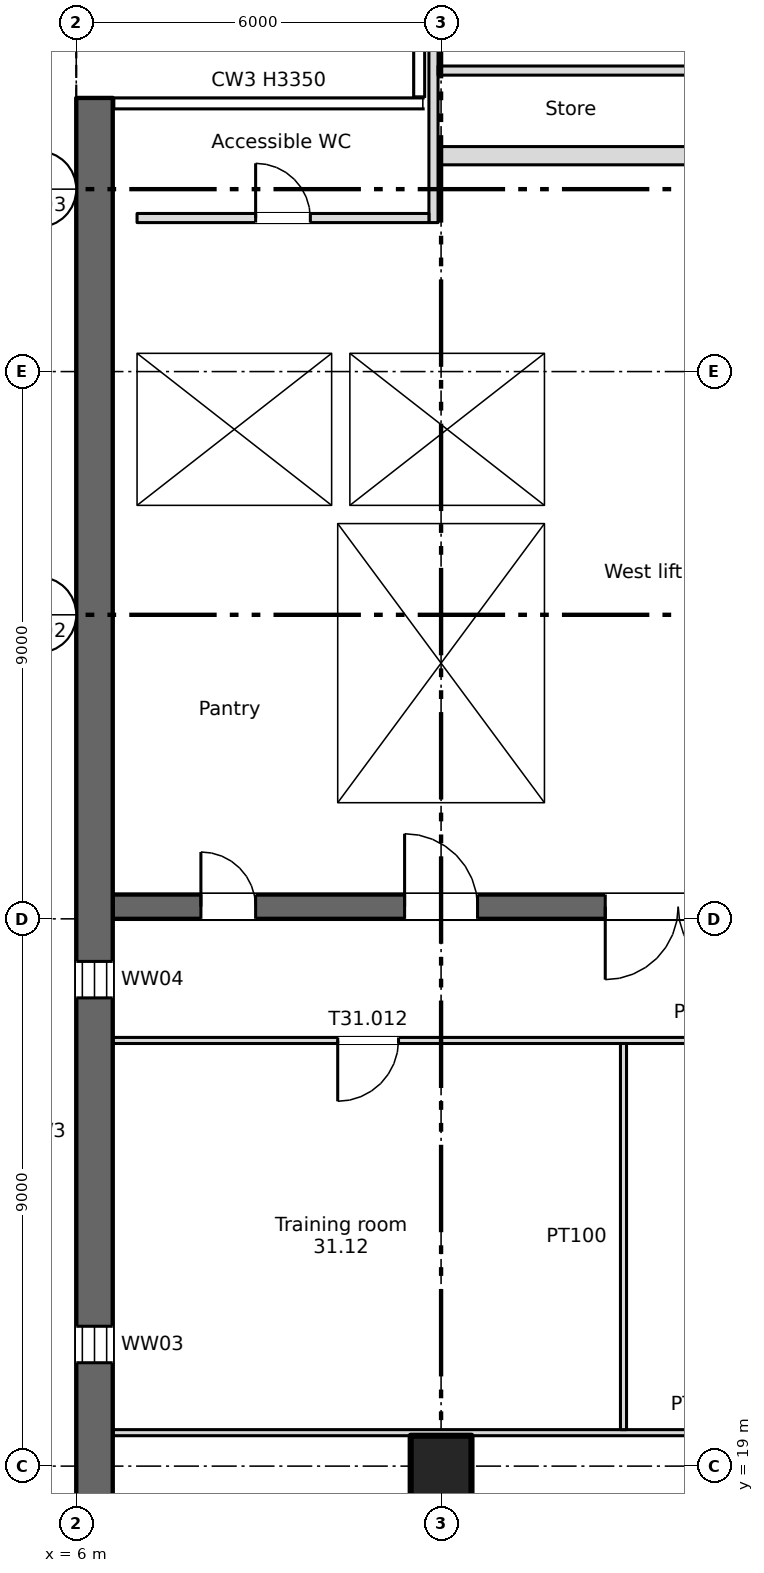
"""IFC4 building model, lengths in metres.
Left out: names, types, materials, properties, quantities, classifications, styles, units other than length and angle.
Written with IfcOpenShell. Run it as: python <this file> out.ifc"""

import sys

from ifc_helpers import new_model, si_unit, direction, frame, frame_2d, origin, origin_2d, place, context, subcontext, project, spatial, rectangle, extrude, element, fill, save


model = new_model("IFC4")
c1 = context("Model", 3, precision=1e-05, world=origin(), true_north=direction((0.0, 1.0)))
c2 = subcontext(c1, "Body", "Model", "MODEL_VIEW")
j1 = project(units=[si_unit("LENGTHUNIT", "METRE"), si_unit("PLANEANGLEUNIT", "RADIAN")], contexts=[c1])
p1 = place(None, origin())
s1 = spatial("IfcSite", under=j1, at=p1, CompositionType="ELEMENT")
p2 = place(p1, origin())
s2 = spatial("IfcBuilding", under=s1, at=p2, CompositionType="ELEMENT")
p3 = place(p2, frame((0.0, 0.0, 215.5)))
s3 = spatial("IfcBuildingStorey", under=s2, at=p3, CompositionType="ELEMENT", Elevation=215.5)
p4 = place(p3, frame((12.0, 19.0, 0.0), z_axis=(0.0, 0.0, 1.0), x_axis=(1.0, 0.0, 0.0)))
e1 = element("IfcColumn", 1, at=p4, inside=s3, PredefinedType="COLUMN", context=c2, shape_type="SweptSolid", body=[
    extrude(rectangle(XDim=1.0, YDim=1.0, at=origin_2d()), origin(), (0.0, 0.0, 1.0), 3.35),
])
p5 = place(p3, frame((6.3, 7.5, 0.0), z_axis=(0.0, 0.0, 1.0), x_axis=(0.0, 1.0, 0.0)))
e2 = element("IfcWall", 2, at=p5, inside=s3, PredefinedType="SHEAR", context=c2, shape_type="SweptSolid", body=[
    extrude(rectangle(XDim=34.0, YDim=0.6, at=frame_2d((17.0, 0.0))), origin(), (0.0, 0.0, 1.0), 3.35),
])
p6 = place(p5, frame((1.2, 0.0, 0.6)))
e3 = element("IfcOpeningElement", 3, at=p6, cuts=e2, PredefinedType="OPENING", context=c2, shape_type="SweptSolid", body=[
    extrude(rectangle(XDim=0.6, YDim=2.4, at=frame_2d((0.3, 1.2))), frame((0.0, 0.31, 0.0), z_axis=(0.0, -1.0, 0.0), x_axis=(1.0, 0.0, 0.0)), (0.0, 0.0, 1.0), 0.62),
])
p7 = place(p5, frame((7.2, 0.0, 0.6)))
e4 = element("IfcOpeningElement", 4, at=p7, cuts=e2, PredefinedType="OPENING", context=c2, shape_type="SweptSolid", body=[
    extrude(rectangle(XDim=0.6, YDim=2.4, at=frame_2d((0.3, 1.2))), frame((0.0, 0.31, 0.0), z_axis=(0.0, -1.0, 0.0), x_axis=(1.0, 0.0, 0.0)), (0.0, 0.0, 1.0), 0.62),
])
p8 = place(p5, frame((13.2, 0.0, 0.6)))
e5 = element("IfcOpeningElement", 5, at=p8, cuts=e2, PredefinedType="OPENING", context=c2, shape_type="SweptSolid", body=[
    extrude(rectangle(XDim=0.6, YDim=2.4, at=frame_2d((0.3, 1.2))), frame((0.0, 0.31, 0.0), z_axis=(0.0, -1.0, 0.0), x_axis=(1.0, 0.0, 0.0)), (0.0, 0.0, 1.0), 0.62),
])
p9 = place(p5, frame((19.2, 0.0, 0.6)))
e6 = element("IfcOpeningElement", 6, at=p9, cuts=e2, PredefinedType="OPENING", context=c2, shape_type="SweptSolid", body=[
    extrude(rectangle(XDim=0.6, YDim=2.4, at=frame_2d((0.3, 1.2))), frame((0.0, 0.31, 0.0), z_axis=(0.0, -1.0, 0.0), x_axis=(1.0, 0.0, 0.0)), (0.0, 0.0, 1.0), 0.62),
])
p10 = place(p3, frame((6.6, 28.2, 0.0), z_axis=(0.0, 0.0, 1.0), x_axis=(1.0, 0.0, 0.0)))
e7 = element("IfcWall", 7, at=p10, inside=s3, PredefinedType="SHEAR", context=c2, shape_type="SweptSolid", body=[
    extrude(rectangle(XDim=57.9, YDim=0.4, at=frame_2d((28.95, 0.0))), origin(), (0.0, 0.0, 1.0), 3.35),
])
p11 = place(p10, frame((12.163, 0.0, 0.0)))
e8 = element("IfcOpeningElement", 8, at=p11, cuts=e7, PredefinedType="OPENING", context=c2, shape_type="SweptSolid", body=[
    extrude(rectangle(XDim=0.9, YDim=2.1, at=frame_2d((0.45, 1.05))), frame((0.0, 0.21, 0.0), z_axis=(0.0, -1.0, 0.0), x_axis=(1.0, 0.0, 0.0)), (0.0, 0.0, 1.0), 0.42),
])
p12 = place(p10, frame((14.738, 0.0, 0.0)))
e9 = element("IfcOpeningElement", 9, at=p12, cuts=e7, PredefinedType="OPENING", context=c2, shape_type="SweptSolid", body=[
    extrude(rectangle(XDim=0.9, YDim=2.1, at=frame_2d((0.45, 1.05))), frame((0.0, 0.21, 0.0), z_axis=(0.0, -1.0, 0.0), x_axis=(1.0, 0.0, 0.0)), (0.0, 0.0, 1.0), 0.42),
])
p13 = place(p10, frame((49.163, 0.0, 0.0)))
e10 = element("IfcOpeningElement", 10, at=p13, cuts=e7, PredefinedType="OPENING", context=c2, shape_type="SweptSolid", body=[
    extrude(rectangle(XDim=0.9, YDim=2.1, at=frame_2d((0.45, 1.05))), frame((0.0, 0.21, 0.0), z_axis=(0.0, -1.0, 0.0), x_axis=(1.0, 0.0, 0.0)), (0.0, 0.0, 1.0), 0.42),
])
p14 = place(p10, frame((51.738, 0.0, 0.0)))
e11 = element("IfcOpeningElement", 11, at=p14, cuts=e7, PredefinedType="OPENING", context=c2, shape_type="SweptSolid", body=[
    extrude(rectangle(XDim=0.9, YDim=2.1, at=frame_2d((0.45, 1.05))), frame((0.0, 0.21, 0.0), z_axis=(0.0, -1.0, 0.0), x_axis=(1.0, 0.0, 0.0)), (0.0, 0.0, 1.0), 0.42),
])
p15 = place(p10, frame((1.45, 0.0, 0.0)))
e12 = element("IfcOpeningElement", 12, at=p15, cuts=e7, PredefinedType="OPENING", context=c2, shape_type="SweptSolid", body=[
    extrude(rectangle(XDim=0.9, YDim=2.1, at=frame_2d((0.45, 1.05))), frame((0.0, 0.21, 0.0), z_axis=(0.0, -1.0, 0.0), x_axis=(1.0, 0.0, 0.0)), (0.0, 0.0, 1.0), 0.42),
])
p16 = place(p10, frame((4.8, 0.0, 0.0)))
e13 = element("IfcOpeningElement", 13, at=p16, cuts=e7, PredefinedType="OPENING", context=c2, shape_type="SweptSolid", body=[
    extrude(rectangle(XDim=1.2, YDim=2.1, at=frame_2d((0.6, 1.05))), frame((0.0, 0.21, 0.0), z_axis=(0.0, -1.0, 0.0), x_axis=(1.0, 0.0, 0.0)), (0.0, 0.0, 1.0), 0.42),
])
p17 = place(p10, frame((31.8, 0.0, 0.0)))
e14 = element("IfcOpeningElement", 14, at=p17, cuts=e7, PredefinedType="OPENING", context=c2, shape_type="SweptSolid", body=[
    extrude(rectangle(XDim=1.2, YDim=2.1, at=frame_2d((0.6, 1.05))), frame((0.0, 0.21, 0.0), z_axis=(0.0, -1.0, 0.0), x_axis=(1.0, 0.0, 0.0)), (0.0, 0.0, 1.0), 0.42),
])
p18 = place(p10, frame((55.3, 0.0, 0.0)))
e15 = element("IfcOpeningElement", 15, at=p18, cuts=e7, PredefinedType="OPENING", context=c2, shape_type="SweptSolid", body=[
    extrude(rectangle(XDim=1.2, YDim=2.1, at=frame_2d((0.6, 1.05))), frame((0.0, 0.21, 0.0), z_axis=(0.0, -1.0, 0.0), x_axis=(1.0, 0.0, 0.0)), (0.0, 0.0, 1.0), 0.42),
])
p19 = place(p10, frame((21.8, 0.0, 0.0)))
e16 = element("IfcOpeningElement", 16, at=p19, cuts=e7, PredefinedType="OPENING", context=c2, shape_type="SweptSolid", body=[
    extrude(rectangle(XDim=1.2, YDim=2.1, at=frame_2d((0.6, 1.05))), frame((0.0, 0.21, 0.0), z_axis=(0.0, -1.0, 0.0), x_axis=(1.0, 0.0, 0.0)), (0.0, 0.0, 1.0), 0.42),
])
p20 = place(p10, frame((41.8, 0.0, 0.0)))
e17 = element("IfcOpeningElement", 17, at=p20, cuts=e7, PredefinedType="OPENING", context=c2, shape_type="SweptSolid", body=[
    extrude(rectangle(XDim=1.2, YDim=2.1, at=frame_2d((0.6, 1.05))), frame((0.0, 0.21, 0.0), z_axis=(0.0, -1.0, 0.0), x_axis=(1.0, 0.0, 0.0)), (0.0, 0.0, 1.0), 0.42),
])
p21 = place(p10, frame((24.95, 0.0, 0.0)))
e18 = element("IfcOpeningElement", 18, at=p21, cuts=e7, PredefinedType="OPENING", context=c2, shape_type="SweptSolid", body=[
    extrude(rectangle(XDim=2.4, YDim=2.1, at=frame_2d((1.2, 1.05))), frame((0.0, 0.21, 0.0), z_axis=(0.0, -1.0, 0.0), x_axis=(1.0, 0.0, 0.0)), (0.0, 0.0, 1.0), 0.42),
])
p22 = place(p10, frame((37.45, 0.0, 0.0)))
e19 = element("IfcOpeningElement", 19, at=p22, cuts=e7, PredefinedType="OPENING", context=c2, shape_type="SweptSolid", body=[
    extrude(rectangle(XDim=2.4, YDim=2.1, at=frame_2d((1.2, 1.05))), frame((0.0, 0.21, 0.0), z_axis=(0.0, -1.0, 0.0), x_axis=(1.0, 0.0, 0.0)), (0.0, 0.0, 1.0), 0.42),
])
p23 = place(p10, frame((8.1, 0.0, 0.0)))
e20 = element("IfcOpeningElement", 20, at=p23, cuts=e7, PredefinedType="OPENING", context=c2, shape_type="SweptSolid", body=[
    extrude(rectangle(XDim=2.4, YDim=2.1, at=frame_2d((1.2, 1.05))), frame((0.0, 0.21, 0.0), z_axis=(0.0, -1.0, 0.0), x_axis=(1.0, 0.0, 0.0)), (0.0, 0.0, 1.0), 0.42),
])
p24 = place(p10, frame((28.95, 0.0, 0.0)))
e21 = element("IfcOpeningElement", 21, at=p24, cuts=e7, PredefinedType="OPENING", context=c2, shape_type="SweptSolid", body=[
    extrude(rectangle(XDim=0.9, YDim=2.1, at=frame_2d((0.45, 1.05))), frame((0.0, 0.21, 0.0), z_axis=(0.0, -1.0, 0.0), x_axis=(1.0, 0.0, 0.0)), (0.0, 0.0, 1.0), 0.42),
])
p25 = place(p10, frame((34.95, 0.0, 0.0)))
e22 = element("IfcOpeningElement", 22, at=p25, cuts=e7, PredefinedType="OPENING", context=c2, shape_type="SweptSolid", body=[
    extrude(rectangle(XDim=0.9, YDim=2.1, at=frame_2d((0.45, 1.05))), frame((0.0, 0.21, 0.0), z_axis=(0.0, -1.0, 0.0), x_axis=(1.0, 0.0, 0.0)), (0.0, 0.0, 1.0), 0.42),
])
p26 = place(p3, frame((6.8, 28.4, 0.0), z_axis=(0.0, 0.0, 1.0), x_axis=(0.0, 1.0, 0.0)))
e23 = element("IfcWall", 23, at=p26, inside=s3, PredefinedType="SHEAR", context=c2, shape_type="SweptSolid", body=[
    extrude(rectangle(XDim=12.85, YDim=0.4, at=frame_2d((6.425, 0.0))), origin(), (0.0, 0.0, 1.0), 3.35),
])
for number, where, z_axis, x_axis in (
    (24, (10.15, 28.4, 0.0), (0.0, 0.0, 1.0), (0.0, 1.0, 0.0)),
    (25, (13.85, 28.4, 0.0), (0.0, 0.0, 1.0), (0.0, 1.0, 0.0)),
):
    element("IfcWall", number, at=place(p3, frame(where, z_axis=z_axis, x_axis=x_axis)), inside=s3, PredefinedType="SHEAR", context=c2, shape_type="SweptSolid", body=[
        extrude(rectangle(XDim=6.1, YDim=0.3, at=frame_2d((3.05, 0.0))), origin(), (0.0, 0.0, 1.0), 3.35),
    ])
for number, where, z_axis, x_axis in (
    (26, (7.0, 34.65, 0.0), (0.0, 0.0, 1.0), (1.0, 0.0, 0.0)),
    (27, (7.0, 37.45, 0.0), (0.0, 0.0, 1.0), (1.0, 0.0, 0.0)),
):
    element("IfcWall", number, at=place(p3, frame(where, z_axis=z_axis, x_axis=x_axis)), inside=s3, PredefinedType="SHEAR", context=c2, shape_type="SweptSolid", body=[
        extrude(rectangle(XDim=7.0, YDim=0.3, at=frame_2d((3.5, 0.0))), origin(), (0.0, 0.0, 1.0), 3.35),
    ])
p27 = place(p3, frame((13.85, 34.8, 0.0), z_axis=(0.0, 0.0, 1.0), x_axis=(0.0, 1.0, 0.0)))
e28 = element("IfcWall", 28, at=p27, inside=s3, PredefinedType="SHEAR", context=c2, shape_type="SweptSolid", body=[
    extrude(rectangle(XDim=2.5, YDim=0.3, at=frame_2d((1.25, 0.0))), origin(), (0.0, 0.0, 1.0), 3.35),
])
p28 = place(p3, frame((11.95, 40.55, 0.0), z_axis=(0.0, 0.0, 1.0), x_axis=(1.0, 0.0, 0.0)))
e29 = element("IfcWall", 29, at=p28, inside=s3, PredefinedType="PARTITIONING", context=c2, shape_type="SweptSolid", body=[
    extrude(rectangle(XDim=4.35, YDim=0.3, at=frame_2d((2.175, 0.0))), origin(), (0.0, 0.0, 1.0), 3.35),
])
p29 = place(p3, frame((10.35, 34.8, 0.0), z_axis=(0.0, 0.0, 1.0), x_axis=(0.0, 1.0, 0.0)))
e30 = element("IfcWall", 30, at=p29, inside=s3, PredefinedType="SHEAR", context=c2, shape_type="SweptSolid", body=[
    extrude(rectangle(XDim=2.5, YDim=0.3, at=frame_2d((1.25, 0.0))), origin(), (0.0, 0.0, 1.0), 3.35),
])
p30 = place(p3, frame((11.875, 39.45, 0.0), z_axis=(0.0, 0.0, 1.0), x_axis=(0.0, 1.0, 0.0)))
e31 = element("IfcWall", 31, at=p30, inside=s3, PredefinedType="PARTITIONING", context=c2, shape_type="SweptSolid", body=[
    extrude(rectangle(XDim=5.85, YDim=0.15, at=frame_2d((2.925, 0.0))), origin(), (0.0, 0.0, 1.0), 3.35),
])
p31 = place(p3, frame((7.0, 39.525, 0.0), z_axis=(0.0, 0.0, 1.0), x_axis=(1.0, 0.0, 0.0)))
e32 = element("IfcWall", 32, at=p31, inside=s3, PredefinedType="PARTITIONING", context=c2, shape_type="SweptSolid", body=[
    extrude(rectangle(XDim=4.8, YDim=0.15, at=frame_2d((2.4, 0.0))), origin(), (0.0, 0.0, 1.0), 3.35),
])
p32 = place(p31, frame((1.95, 0.0, 0.0)))
e33 = element("IfcOpeningElement", 33, at=p32, cuts=e32, PredefinedType="OPENING", context=c2, shape_type="SweptSolid", body=[
    extrude(rectangle(XDim=0.9, YDim=2.1, at=frame_2d((0.45, 1.05))), frame((0.0, 0.085, 0.0), z_axis=(0.0, -1.0, 0.0), x_axis=(1.0, 0.0, 0.0)), (0.0, 0.0, 1.0), 0.17),
])
p33 = place(p3, frame((11.95, 41.95, 0.0), z_axis=(0.0, 0.0, 1.0), x_axis=(1.0, 0.0, 0.0)))
e34 = element("IfcWall", 34, at=p33, inside=s3, PredefinedType="PARTITIONING", context=c2, shape_type="SweptSolid", body=[
    extrude(rectangle(XDim=4.2, YDim=0.15, at=frame_2d((2.1, 0.0))), origin(), (0.0, 0.0, 1.0), 3.35),
])
p34 = place(p3, frame((6.6, 19.55, 0.0), z_axis=(0.0, 0.0, 1.0), x_axis=(1.0, 0.0, 0.0)))
e35 = element("IfcWall", 35, at=p34, inside=s3, PredefinedType="PARTITIONING", context=c2, shape_type="SweptSolid", body=[
    extrude(rectangle(XDim=19.35, YDim=0.1, at=frame_2d((9.675, 0.0))), origin(), (0.0, 0.0, 1.0), 3.35),
])
p35 = place(p3, frame((6.6, 26.0, 0.0), z_axis=(0.0, 0.0, 1.0), x_axis=(1.0, 0.0, 0.0)))
e36 = element("IfcWall", 36, at=p35, inside=s3, PredefinedType="PARTITIONING", context=c2, shape_type="SweptSolid", body=[
    extrude(rectangle(XDim=19.45, YDim=0.1, at=frame_2d((9.725, 0.0))), origin(), (0.0, 0.0, 1.0), 3.35),
])
p36 = place(p35, frame((3.7, 0.0, 0.0)))
e37 = element("IfcOpeningElement", 37, at=p36, cuts=e36, PredefinedType="OPENING", context=c2, shape_type="SweptSolid", body=[
    extrude(rectangle(XDim=1.0, YDim=2.1, at=frame_2d((0.5, 1.05))), frame((0.0, 0.06, 0.0), z_axis=(0.0, -1.0, 0.0), x_axis=(1.0, 0.0, 0.0)), (0.0, 0.0, 1.0), 0.12),
])
p37 = place(p35, frame((13.0, 0.0, 0.0)))
e38 = element("IfcOpeningElement", 38, at=p37, cuts=e36, PredefinedType="OPENING", context=c2, shape_type="SweptSolid", body=[
    extrude(rectangle(XDim=1.8, YDim=2.1, at=frame_2d((0.9, 1.05))), frame((0.0, 0.06, 0.0), z_axis=(0.0, -1.0, 0.0), x_axis=(1.0, 0.0, 0.0)), (0.0, 0.0, 1.0), 0.12),
])
p38 = place(p3, frame((15.0, 19.6, 0.0), z_axis=(0.0, 0.0, 1.0), x_axis=(0.0, 1.0, 0.0)))
e39 = element("IfcWall", 39, at=p38, inside=s3, PredefinedType="PARTITIONING", context=c2, shape_type="SweptSolid", body=[
    extrude(rectangle(XDim=6.35, YDim=0.1, at=frame_2d((3.175, 0.0))), origin(), (0.0, 0.0, 1.0), 3.35),
])
p39 = place(p8, origin())
e40 = element("IfcWindow", 40, at=p39, inside=s3, PartitioningType="SINGLE_PANEL", PredefinedType="WINDOW", context=c2, shape_type="SweptSolid", body=[
    extrude(rectangle(XDim=0.6, YDim=2.4, at=frame_2d((0.3, 1.2))), frame((0.0, 0.03, 0.0), z_axis=(0.0, -1.0, 0.0), x_axis=(1.0, 0.0, 0.0)), (0.0, 0.0, 1.0), 0.06),
])
fill(e5, e40)
p40 = place(p9, origin())
e41 = element("IfcWindow", 41, at=p40, inside=s3, PartitioningType="SINGLE_PANEL", PredefinedType="WINDOW", context=c2, shape_type="SweptSolid", body=[
    extrude(rectangle(XDim=0.6, YDim=2.4, at=frame_2d((0.3, 1.2))), frame((0.0, 0.03, 0.0), z_axis=(0.0, -1.0, 0.0), x_axis=(1.0, 0.0, 0.0)), (0.0, 0.0, 1.0), 0.06),
])
fill(e6, e41)
p41 = place(p15, origin())
e42 = element("IfcDoor", 42, at=p41, inside=s3, OperationType="SINGLE_SWING_LEFT", PredefinedType="DOOR", context=c2, shape_type="SweptSolid", body=[
    extrude(rectangle(XDim=0.9, YDim=2.1, at=frame_2d((0.45, 1.05))), frame((0.0, 0.025, 0.0), z_axis=(0.0, -1.0, 0.0), x_axis=(1.0, 0.0, 0.0)), (0.0, 0.0, 1.0), 0.05),
])
fill(e12, e42)
p42 = place(p32, origin())
e43 = element("IfcDoor", 43, at=p42, inside=s3, OperationType="SINGLE_SWING_LEFT", PredefinedType="DOOR", context=c2, shape_type="SweptSolid", body=[
    extrude(rectangle(XDim=0.9, YDim=2.1, at=frame_2d((0.45, 1.05))), frame((0.0, 0.025, 0.0), z_axis=(0.0, -1.0, 0.0), x_axis=(1.0, 0.0, 0.0)), (0.0, 0.0, 1.0), 0.05),
])
fill(e33, e43)
p43 = place(p16, origin())
e44 = element("IfcDoor", 44, at=p43, inside=s3, OperationType="SINGLE_SWING_LEFT", PredefinedType="DOOR", context=c2, shape_type="SweptSolid", body=[
    extrude(rectangle(XDim=1.2, YDim=2.1, at=frame_2d((0.6, 1.05))), frame((0.0, 0.025, 0.0), z_axis=(0.0, -1.0, 0.0), x_axis=(1.0, 0.0, 0.0)), (0.0, 0.0, 1.0), 0.05),
])
fill(e13, e44)
p44 = place(p23, origin())
e45 = element("IfcDoor", 45, at=p44, inside=s3, OperationType="DOUBLE_DOOR_SINGLE_SWING", PredefinedType="DOOR", context=c2, shape_type="SweptSolid", body=[
    extrude(rectangle(XDim=2.4, YDim=2.1, at=frame_2d((1.2, 1.05))), frame((0.0, 0.025, 0.0), z_axis=(0.0, -1.0, 0.0), x_axis=(1.0, 0.0, 0.0)), (0.0, 0.0, 1.0), 0.05),
])
fill(e20, e45)
p45 = place(p36, origin())
e46 = element("IfcDoor", 46, at=p45, inside=s3, OperationType="SINGLE_SWING_LEFT", PredefinedType="DOOR", context=c2, shape_type="SweptSolid", body=[
    extrude(rectangle(XDim=1.0, YDim=2.1, at=frame_2d((0.5, 1.05))), frame((0.0, 0.025, 0.0), z_axis=(0.0, -1.0, 0.0), x_axis=(1.0, 0.0, 0.0)), (0.0, 0.0, 1.0), 0.05),
])
fill(e37, e46)
save(model, sys.argv[1])
